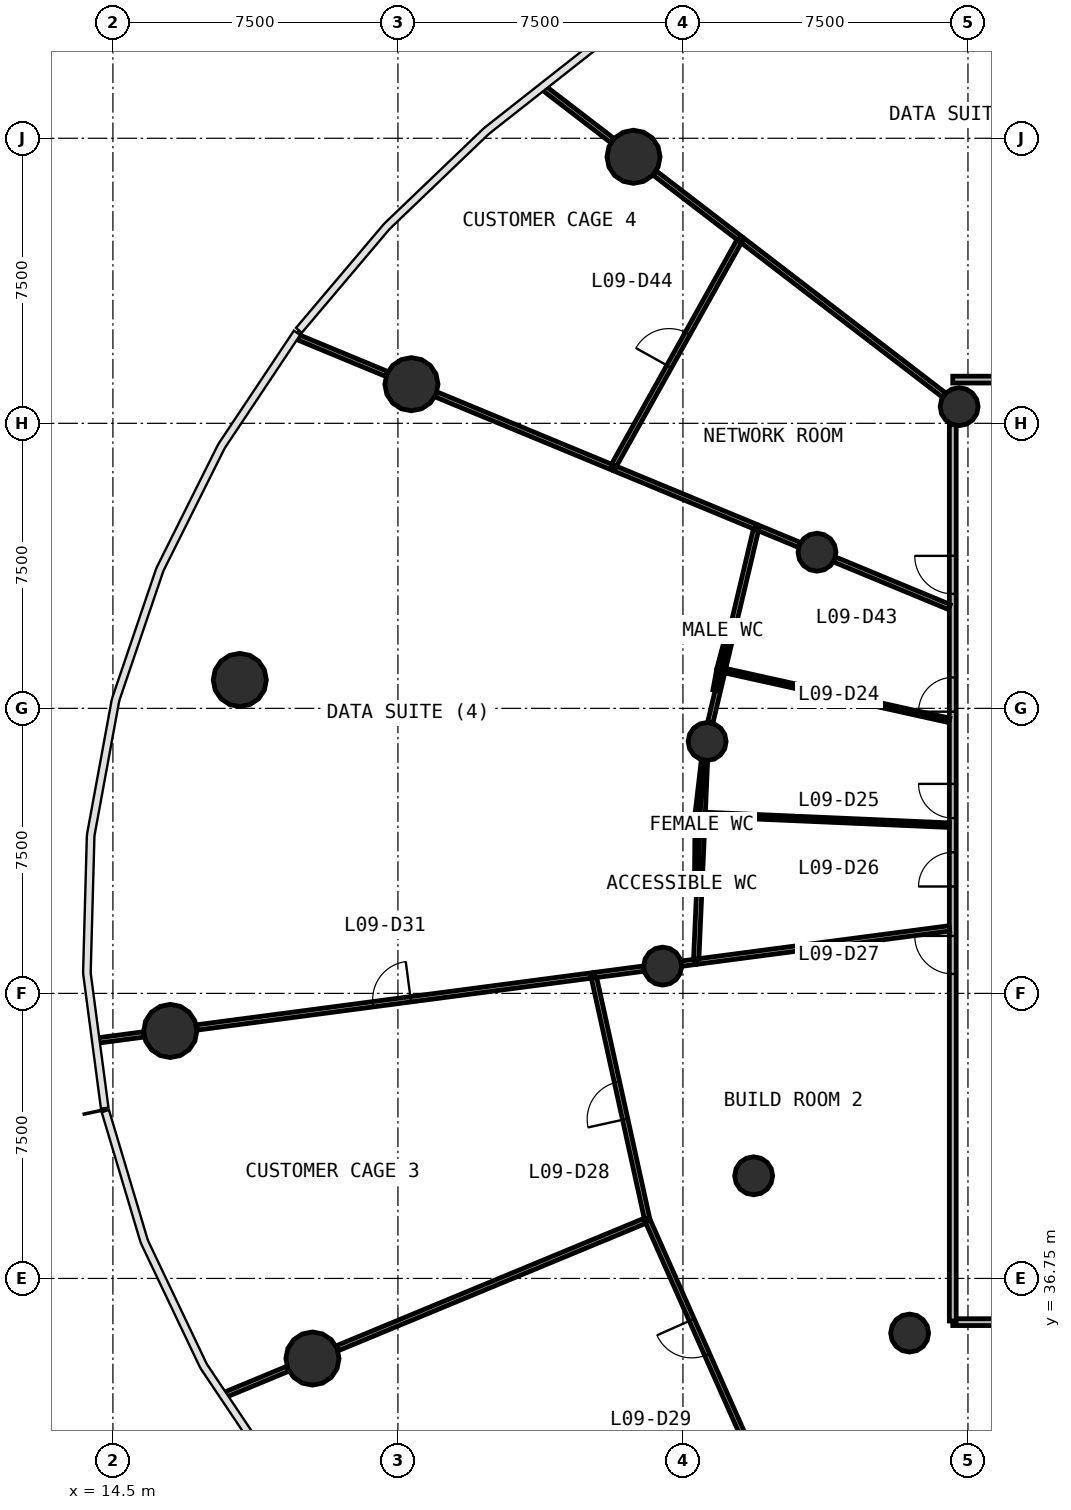
"""IFC4 building model, lengths in metres.
Left out: names, types, materials, properties, quantities, classifications, styles, units other than length and angle.
Written with IfcOpenShell. Run it as: python <this file> out.ifc"""

import sys

from ifc_helpers import new_model, si_unit, direction, frame, frame_2d, origin, origin_2d, place, context, subcontext, project, spatial, rectangle, circle, extrude, source, transform, mapped, element, fill, save


model = new_model("IFC4")
c1 = context("Model", 3, precision=1e-05, world=origin(), true_north=direction((0.0, 1.0)))
c2 = subcontext(c1, "Body", "Model", "MODEL_VIEW")
j1 = project(units=[si_unit("LENGTHUNIT", "METRE"), si_unit("PLANEANGLEUNIT", "RADIAN")], contexts=[c1])
p1 = place(None, origin())
s1 = spatial("IfcSite", under=j1, at=p1, CompositionType="ELEMENT")
p2 = place(p1, origin())
s2 = spatial("IfcBuilding", under=s1, at=p2, CompositionType="ELEMENT")
p3 = place(p2, frame((0.0, 0.0, 40.2)))
s3 = spatial("IfcBuildingStorey", under=s2, at=p3, CompositionType="ELEMENT", Elevation=40.2)
m1 = source(origin(), c2, "Body", "SweptSolid", [
    extrude(circle(Radius=0.7, at=origin_2d()), origin(), (0.0, 0.0, 1.0), 4.4),
])
for number, where, z_axis, x_axis in (
    (1, (28.199, 66.263, 0.0), (0.0, 0.0, 1.0), (1.0, 0.0, 0.0)),
    (2, (22.355, 60.279, 0.0), (0.0, 0.0, 1.0), (1.0, 0.0, 0.0)),
    (3, (17.839, 52.497, 0.0), (0.0, 0.0, 1.0), (1.0, 0.0, 0.0)),
    (4, (16.01, 43.262, 0.0), (0.0, 0.0, 1.0), (1.0, 0.0, 0.0)),
    (5, (19.751, 34.642, 0.0), (0.0, 0.0, 1.0), (1.0, 0.0, 0.0)),
):
    element("IfcColumn", number, at=place(p3, frame(where, z_axis=z_axis, x_axis=x_axis)), inside=s3, PredefinedType="COLUMN", context=c2, shape_type="MappedRepresentation", body=[
        mapped(m1, transform((0.0, 0.0, 0.0), scale=1.0)),
    ])
m2 = source(origin(), c2, "Body", "SweptSolid", [
    extrude(circle(Radius=0.5, at=origin_2d()), origin(), (0.0, 0.0, 1.0), 4.4),
])
for number, where, z_axis, x_axis in (
    (6, (36.768, 59.688, 0.0), (0.0, 0.0, 1.0), (1.0, 0.0, 0.0)),
    (7, (33.028, 55.859, 0.0), (0.0, 0.0, 1.0), (1.0, 0.0, 0.0)),
    (8, (30.137, 50.878, 0.0), (0.0, 0.0, 1.0), (1.0, 0.0, 0.0)),
    (9, (28.966, 44.968, 0.0), (0.0, 0.0, 1.0), (1.0, 0.0, 0.0)),
    (10, (31.361, 39.451, 0.0), (0.0, 0.0, 1.0), (1.0, 0.0, 0.0)),
    (11, (35.465, 35.312, 0.0), (0.0, 0.0, 1.0), (1.0, 0.0, 0.0)),
):
    element("IfcColumn", number, at=place(p3, frame(where, z_axis=z_axis, x_axis=x_axis)), inside=s3, PredefinedType="COLUMN", context=c2, shape_type="MappedRepresentation", body=[
        mapped(m2, transform((0.0, 0.0, 0.0), scale=1.0)),
    ])
p4 = place(p3, frame((67.4, 35.6, 0.0), z_axis=(0.0, 0.0, 1.0), x_axis=(-1.0, 0.0, 0.0)))
e12 = element("IfcWall", 12, at=p4, inside=s3, PredefinedType="PARTITIONING", context=c2, shape_type="SweptSolid", body=[
    extrude(rectangle(XDim=30.8, YDim=0.18, at=frame_2d((15.4, 0.0))), origin(), (0.0, 0.0, 1.0), 3.05),
])
p5 = place(p4, frame((17.35, 0.0, 0.0)))
e13 = element("IfcOpeningElement", 13, at=p5, cuts=e12, PredefinedType="OPENING", context=c2, shape_type="SweptSolid", body=[
    extrude(rectangle(XDim=1.0, YDim=2.1, at=frame_2d((0.5, 1.05))), frame((0.0, 0.1, 0.0), z_axis=(0.0, -1.0, 0.0), x_axis=(1.0, 0.0, 0.0)), (0.0, 0.0, 1.0), 0.2),
])
p6 = place(p4, frame((14.95, 0.0, 0.0)))
e14 = element("IfcOpeningElement", 14, at=p6, cuts=e12, PredefinedType="OPENING", context=c2, shape_type="SweptSolid", body=[
    extrude(rectangle(XDim=1.0, YDim=2.1, at=frame_2d((0.5, 1.05))), frame((0.0, 0.1, 0.0), z_axis=(0.0, -1.0, 0.0), x_axis=(1.0, 0.0, 0.0)), (0.0, 0.0, 1.0), 0.2),
])
p7 = place(p3, frame((36.6, 60.4, 0.0), z_axis=(0.0, 0.0, 1.0), x_axis=(1.0, 0.0, 0.0)))
e15 = element("IfcWall", 15, at=p7, inside=s3, PredefinedType="PARTITIONING", context=c2, shape_type="SweptSolid", body=[
    extrude(rectangle(XDim=30.8, YDim=0.18, at=frame_2d((15.4, 0.0))), origin(), (0.0, 0.0, 1.0), 3.05),
])
p8 = place(p7, frame((20.95, 0.0, 0.0)))
e16 = element("IfcOpeningElement", 16, at=p8, cuts=e15, PredefinedType="OPENING", context=c2, shape_type="SweptSolid", body=[
    extrude(rectangle(XDim=1.0, YDim=2.1, at=frame_2d((0.5, 1.05))), frame((0.0, 0.1, 0.0), z_axis=(0.0, -1.0, 0.0), x_axis=(1.0, 0.0, 0.0)), (0.0, 0.0, 1.0), 0.2),
])
p9 = place(p7, frame((14.95, 0.0, 0.0)))
e17 = element("IfcOpeningElement", 17, at=p9, cuts=e15, PredefinedType="OPENING", context=c2, shape_type="SweptSolid", body=[
    extrude(rectangle(XDim=1.0, YDim=2.1, at=frame_2d((0.5, 1.05))), frame((0.0, 0.1, 0.0), z_axis=(0.0, -1.0, 0.0), x_axis=(1.0, 0.0, 0.0)), (0.0, 0.0, 1.0), 0.2),
])
p10 = place(p7, frame((8.95, 0.0, 0.0)))
e18 = element("IfcOpeningElement", 18, at=p10, cuts=e15, PredefinedType="OPENING", context=c2, shape_type="SweptSolid", body=[
    extrude(rectangle(XDim=1.0, YDim=2.1, at=frame_2d((0.5, 1.05))), frame((0.0, 0.1, 0.0), z_axis=(0.0, -1.0, 0.0), x_axis=(1.0, 0.0, 0.0)), (0.0, 0.0, 1.0), 0.2),
])
p11 = place(p3, frame((36.6, 35.63, 0.0), z_axis=(0.0, 0.0, 1.0), x_axis=(0.0, 1.0, 0.0)))
e19 = element("IfcWall", 19, at=p11, inside=s3, PredefinedType="PARTITIONING", context=c2, shape_type="SweptSolid", body=[
    extrude(rectangle(XDim=23.583, YDim=0.18, at=frame_2d((11.791, 0.0))), origin(), (0.0, 0.0, 1.0), 3.05),
])
p12 = place(p11, frame((16.032, 0.0, 0.0)))
e20 = element("IfcOpeningElement", 20, at=p12, cuts=e19, PredefinedType="OPENING", context=c2, shape_type="SweptSolid", body=[
    extrude(rectangle(XDim=0.9, YDim=2.1, at=frame_2d((0.45, 1.05))), frame((0.0, 0.1, 0.0), z_axis=(0.0, -1.0, 0.0), x_axis=(1.0, 0.0, 0.0)), (0.0, 0.0, 1.0), 0.2),
])
p13 = place(p11, frame((13.232, 0.0, 0.0)))
e21 = element("IfcOpeningElement", 21, at=p13, cuts=e19, PredefinedType="OPENING", context=c2, shape_type="SweptSolid", body=[
    extrude(rectangle(XDim=0.9, YDim=2.1, at=frame_2d((0.45, 1.05))), frame((0.0, 0.1, 0.0), z_axis=(0.0, -1.0, 0.0), x_axis=(1.0, 0.0, 0.0)), (0.0, 0.0, 1.0), 0.2),
])
p14 = place(p11, frame((11.433, 0.0, 0.0)))
e22 = element("IfcOpeningElement", 22, at=p14, cuts=e19, PredefinedType="OPENING", context=c2, shape_type="SweptSolid", body=[
    extrude(rectangle(XDim=0.9, YDim=2.1, at=frame_2d((0.45, 1.05))), frame((0.0, 0.1, 0.0), z_axis=(0.0, -1.0, 0.0), x_axis=(1.0, 0.0, 0.0)), (0.0, 0.0, 1.0), 0.2),
])
p15 = place(p11, frame((9.133, 0.0, 0.0)))
e23 = element("IfcOpeningElement", 23, at=p15, cuts=e19, PredefinedType="OPENING", context=c2, shape_type="SweptSolid", body=[
    extrude(rectangle(XDim=1.0, YDim=2.1, at=frame_2d((0.5, 1.05))), frame((0.0, 0.1, 0.0), z_axis=(0.0, -1.0, 0.0), x_axis=(1.0, 0.0, 0.0)), (0.0, 0.0, 1.0), 0.2),
])
p16 = place(p11, frame((19.133, 0.0, 0.0)))
e24 = element("IfcOpeningElement", 24, at=p16, cuts=e19, PredefinedType="OPENING", context=c2, shape_type="SweptSolid", body=[
    extrude(rectangle(XDim=1.0, YDim=2.1, at=frame_2d((0.5, 1.05))), frame((0.0, 0.1, 0.0), z_axis=(0.0, -1.0, 0.0), x_axis=(1.0, 0.0, 0.0)), (0.0, 0.0, 1.0), 0.2),
])
p17 = place(p3, frame((16.708, 43.354, 0.0), z_axis=(0.0, 0.0, 1.0), x_axis=(0.991445294361, 0.130522903314, 0.0)))
e25 = element("IfcWall", 25, at=p17, inside=s3, PredefinedType="PARTITIONING", context=c2, shape_type="SweptSolid", body=[
    extrude(rectangle(XDim=10.527, YDim=0.14, at=frame_2d((5.264, 0.0))), origin(), (0.0, 0.0, 1.0), 3.05),
])
p18 = place(p17, frame((4.677, 0.0, 0.0)))
e26 = element("IfcOpeningElement", 26, at=p18, cuts=e25, PredefinedType="OPENING", context=c2, shape_type="SweptSolid", body=[
    extrude(rectangle(XDim=1.0, YDim=2.1, at=frame_2d((0.5, 1.05))), frame((0.0, 0.08, 0.0), z_axis=(0.0, -1.0, 0.0), x_axis=(1.0, 0.0, 0.0)), (0.0, 0.0, 1.0), 0.16),
])
p19 = place(p3, frame((28.562, 38.292, 0.0), z_axis=(0.0, 0.0, 1.0), x_axis=(-0.923878024318, -0.382687073445, 0.0)))
e27 = element("IfcWall", 27, at=p19, inside=s3, PredefinedType="PARTITIONING", context=c2, shape_type="SweptSolid", body=[
    extrude(rectangle(XDim=8.832, YDim=0.14, at=frame_2d((4.416, 0.0))), origin(), (0.0, 0.0, 1.0), 3.05),
])
p20 = place(p3, frame((27.65, 58.086, 0.0), z_axis=(0.0, 0.0, 1.0), x_axis=(0.488058671377, 0.872810823314, 0.0)))
e28 = element("IfcWall", 28, at=p20, inside=s3, PredefinedType="PARTITIONING", context=c2, shape_type="SweptSolid", body=[
    extrude(rectangle(XDim=6.894, YDim=0.14, at=frame_2d((3.447, 0.0))), origin(), (0.0, 0.0, 1.0), 3.05),
])
p21 = place(p20, frame((3.043, 0.0, 0.0)))
e29 = element("IfcOpeningElement", 29, at=p21, cuts=e28, PredefinedType="OPENING", context=c2, shape_type="SweptSolid", body=[
    extrude(rectangle(XDim=1.0, YDim=2.1, at=frame_2d((0.5, 1.05))), frame((0.0, 0.08, 0.0), z_axis=(0.0, -1.0, 0.0), x_axis=(1.0, 0.0, 0.0)), (0.0, 0.0, 1.0), 0.16),
])
p22 = place(p3, frame((36.51, 45.961, 0.0), z_axis=(0.0, 0.0, 1.0), x_axis=(-0.991446999642, -0.130509949431, 0.0)))
e30 = element("IfcWall", 30, at=p22, inside=s3, PredefinedType="PARTITIONING", context=c2, shape_type="SweptSolid", body=[
    extrude(rectangle(XDim=6.721, YDim=0.14, at=frame_2d((3.361, 0.0))), origin(), (0.0, 0.0, 1.0), 3.05),
])
p23 = place(p3, frame((31.292, 32.146, 0.0), z_axis=(0.0, 0.0, 1.0), x_axis=(-0.40591511996, 0.913910780869, 0.0)))
e31 = element("IfcWall", 31, at=p23, inside=s3, PredefinedType="PARTITIONING", context=c2, shape_type="SweptSolid", body=[
    extrude(rectangle(XDim=6.694, YDim=0.14, at=frame_2d((3.347, 0.0))), origin(), (0.0, 0.0, 1.0), 3.05),
])
p24 = place(p23, frame((2.844, 0.0, 0.0)))
e32 = element("IfcOpeningElement", 32, at=p24, cuts=e31, PredefinedType="OPENING", context=c2, shape_type="SweptSolid", body=[
    extrude(rectangle(XDim=1.0, YDim=2.1, at=frame_2d((0.5, 1.05))), frame((0.0, 0.08, 0.0), z_axis=(0.0, -1.0, 0.0), x_axis=(1.0, 0.0, 0.0)), (0.0, 0.0, 1.0), 0.16),
])
p25 = place(p3, frame((36.367, 59.995, 0.0), z_axis=(0.0, 0.0, 1.0), x_axis=(-0.793356148501, 0.60875776926, 0.0)))
e33 = element("IfcWall", 33, at=p25, inside=s3, PredefinedType="PARTITIONING", context=c2, shape_type="SweptSolid", body=[
    extrude(rectangle(XDim=6.676, YDim=0.14, at=frame_2d((3.338, 0.0))), origin(), (0.0, 0.0, 1.0), 3.05),
])
p26 = place(p3, frame((28.556, 38.321, 0.0), z_axis=(0.0, 0.0, 1.0), x_axis=(-0.21508144295, 0.976596115546, 0.0)))
e34 = element("IfcWall", 34, at=p26, inside=s3, PredefinedType="PARTITIONING", context=c2, shape_type="SweptSolid", body=[
    extrude(rectangle(XDim=6.53, YDim=0.14, at=frame_2d((3.265, 0.0))), origin(), (0.0, 0.0, 1.0), 3.05),
])
p27 = place(p26, frame((2.68, 0.0, 0.0)))
e35 = element("IfcOpeningElement", 35, at=p27, cuts=e34, PredefinedType="OPENING", context=c2, shape_type="SweptSolid", body=[
    extrude(rectangle(XDim=1.0, YDim=2.1, at=frame_2d((0.5, 1.05))), frame((0.0, 0.08, 0.0), z_axis=(0.0, -1.0, 0.0), x_axis=(1.0, 0.0, 0.0)), (0.0, 0.0, 1.0), 0.16),
])
p28 = place(p3, frame((30.08, 50.377, 0.0), z_axis=(0.0, 0.0, 1.0), x_axis=(-0.044134411389, -0.99902560214, 0.0)))
e36 = element("IfcWall", 36, at=p28, inside=s3, PredefinedType="PARTITIONING", context=c2, shape_type="SweptSolid", body=[
    extrude(rectangle(XDim=5.228, YDim=0.14, at=frame_2d((2.614, 0.0))), origin(), (0.0, 0.0, 1.0), 3.05),
])
p29 = place(p3, frame((31.437, 56.518, 0.0), z_axis=(0.0, 0.0, 1.0), x_axis=(-0.230427237718, -0.973089558118, 0.0)))
e37 = element("IfcWall", 37, at=p29, inside=s3, PredefinedType="PARTITIONING", context=c2, shape_type="SweptSolid", body=[
    extrude(rectangle(XDim=5.284, YDim=0.14, at=frame_2d((2.642, 0.0))), origin(), (0.0, 0.0, 1.0), 3.05),
])
p30 = place(p3, frame((27.623, 58.097, 0.0), z_axis=(0.0, 0.0, 1.0), x_axis=(-0.923864356011, 0.382720069622, 0.0)))
e38 = element("IfcWall", 38, at=p30, inside=s3, PredefinedType="PARTITIONING", context=c2, shape_type="SweptSolid", body=[
    extrude(rectangle(XDim=4.996, YDim=0.14, at=frame_2d((2.498, 0.0))), origin(), (0.0, 0.0, 1.0), 3.05),
])
p31 = place(p3, frame((31.409, 56.529, 0.0), z_axis=(0.0, 0.0, 1.0), x_axis=(-0.923871694758, 0.382702353827, 0.0)))
e39 = element("IfcWall", 39, at=p31, inside=s3, PredefinedType="PARTITIONING", context=c2, shape_type="SweptSolid", body=[
    extrude(rectangle(XDim=3.998, YDim=0.14, at=frame_2d((1.999, 0.0))), origin(), (0.0, 0.0, 1.0), 3.05),
])
p32 = place(p3, frame((36.51, 54.416, 0.0), z_axis=(0.0, 0.0, 1.0), x_axis=(-0.923911109142, 0.382607190737, 0.0)))
e40 = element("IfcWall", 40, at=p32, inside=s3, PredefinedType="PARTITIONING", context=c2, shape_type="SweptSolid", body=[
    extrude(rectangle(XDim=3.264, YDim=0.14, at=frame_2d((1.632, 0.0))), origin(), (0.0, 0.0, 1.0), 3.05),
])
p33 = place(p3, frame((30.991, 64.121, 0.0), z_axis=(0.0, 0.0, 1.0), x_axis=(-0.793361942245, 0.60875021856, 0.0)))
e41 = element("IfcWall", 41, at=p33, inside=s3, PredefinedType="PARTITIONING", context=c2, shape_type="SweptSolid", body=[
    extrude(rectangle(XDim=2.814, YDim=0.14, at=frame_2d((1.407, 0.0))), origin(), (0.0, 0.0, 1.0), 3.05),
])
p34 = place(p3, frame((21.704, 60.549, 0.0), z_axis=(0.0, 0.0, 1.0), x_axis=(-0.923879092029, 0.382684495781, 0.0)))
e42 = element("IfcWall", 42, at=p34, inside=s3, PredefinedType="PARTITIONING", context=c2, shape_type="SweptSolid", body=[
    extrude(rectangle(XDim=2.506, YDim=0.14, at=frame_2d((1.253, 0.0))), origin(), (0.0, 0.0, 1.0), 3.05),
])
p35 = place(p3, frame((27.641, 66.691, 0.0), z_axis=(0.0, 0.0, 1.0), x_axis=(-0.793298337488, 0.608833103353, 0.0)))
e43 = element("IfcWall", 43, at=p35, inside=s3, PredefinedType="PARTITIONING", context=c2, shape_type="SweptSolid", body=[
    extrude(rectangle(XDim=2.246, YDim=0.14, at=frame_2d((1.123, 0.0))), origin(), (0.0, 0.0, 1.0), 3.05),
])
p36 = place(p3, frame((19.1, 34.372, 0.0), z_axis=(0.0, 0.0, 1.0), x_axis=(-0.92390604877, -0.382619410179, 0.0)))
e44 = element("IfcWall", 44, at=p36, inside=s3, PredefinedType="PARTITIONING", context=c2, shape_type="SweptSolid", body=[
    extrude(rectangle(XDim=1.772, YDim=0.14, at=frame_2d((0.886, 0.0))), origin(), (0.0, 0.0, 1.0), 3.05),
])
p37 = place(p3, frame((28.466, 44.902, 0.0), z_axis=(0.0, 0.0, 1.0), x_axis=(-0.991458759568, -0.130420581489, 0.0)))
e45 = element("IfcWall", 45, at=p37, inside=s3, PredefinedType="PARTITIONING", context=c2, shape_type="SweptSolid", body=[
    extrude(rectangle(XDim=1.303, YDim=0.14, at=frame_2d((0.651, 0.0))), origin(), (0.0, 0.0, 1.0), 3.05),
])
p38 = place(p3, frame((15.311, 43.17, 0.0), z_axis=(0.0, 0.0, 1.0), x_axis=(-0.991444195162, -0.130531252505, 0.0)))
e46 = element("IfcWall", 46, at=p38, inside=s3, PredefinedType="PARTITIONING", context=c2, shape_type="SweptSolid", body=[
    extrude(rectangle(XDim=1.234, YDim=0.14, at=frame_2d((0.617, 0.0))), origin(), (0.0, 0.0, 1.0), 3.05),
])
p39 = place(p3, frame((32.561, 56.052, 0.0), z_axis=(0.0, 0.0, 1.0), x_axis=(-0.923881792955, 0.382677975126, 0.0)))
e47 = element("IfcWall", 47, at=p39, inside=s3, PredefinedType="PARTITIONING", context=c2, shape_type="SweptSolid", body=[
    extrude(rectangle(XDim=1.146, YDim=0.14, at=frame_2d((0.573, 0.0))), origin(), (0.0, 0.0, 1.0), 3.05),
])
p40 = place(p3, frame((29.816, 45.08, 0.0), z_axis=(0.0, 0.0, 1.0), x_axis=(-0.99142603388, -0.13066912162, 0.0)))
e48 = element("IfcWall", 48, at=p40, inside=s3, PredefinedType="PARTITIONING", context=c2, shape_type="SweptSolid", body=[
    extrude(rectangle(XDim=0.353, YDim=0.14, at=frame_2d((0.177, 0.0))), origin(), (0.0, 0.0, 1.0), 3.05),
])
p41 = place(p3, frame((36.51, 48.676, 0.0), z_axis=(0.0, 0.0, 1.0), x_axis=(-0.99904754033, 0.043634987792, 0.0)))
e49 = element("IfcWall", 49, at=p41, inside=s3, PredefinedType="PARTITIONING", context=c2, shape_type="SweptSolid", body=[
    extrude(rectangle(XDim=6.429, YDim=0.12, at=frame_2d((3.214, 0.0))), origin(), (0.0, 0.0, 1.0), 3.05),
])
p42 = place(p3, frame((36.51, 51.434, 0.0), z_axis=(0.0, 0.0, 1.0), x_axis=(-0.976293481876, 0.216451004264, 0.0)))
e50 = element("IfcWall", 50, at=p42, inside=s3, PredefinedType="PARTITIONING", context=c2, shape_type="SweptSolid", body=[
    extrude(rectangle(XDim=6.039, YDim=0.12, at=frame_2d((3.02, 0.0))), origin(), (0.0, 0.0, 1.0), 3.05),
])
p43 = place(p3, frame((29.878, 48.966, 0.0), z_axis=(0.0, 0.0, 1.0), x_axis=(-0.008193346553, -0.999966433973, 0.0)))
e51 = element("IfcWall", 51, at=p43, inside=s3, PredefinedType="PARTITIONING", context=c2, shape_type="SweptSolid", body=[
    extrude(rectangle(XDim=1.937, YDim=0.12, at=frame_2d((0.968, 0.0))), origin(), (0.0, 0.0, 1.0), 3.05),
])
p44 = place(p3, frame((30.737, 53.865, 0.0), z_axis=(0.0, 0.0, 1.0), x_axis=(-0.255027437649, -0.966933816787, 0.0)))
e52 = element("IfcWall", 52, at=p44, inside=s3, PredefinedType="PARTITIONING", context=c2, shape_type="SweptSolid", body=[
    extrude(rectangle(XDim=1.125, YDim=0.12, at=frame_2d((0.562, 0.0))), origin(), (0.0, 0.0, 1.0), 3.05),
])
p45 = place(p3, frame((30.044, 50.382, 0.0), z_axis=(0.0, 0.0, 1.0), x_axis=(-0.116303421497, -0.993213730346, 0.0)))
e53 = element("IfcWall", 53, at=p45, inside=s3, PredefinedType="PARTITIONING", context=c2, shape_type="SweptSolid", body=[
    extrude(rectangle(XDim=1.396, YDim=0.12, at=frame_2d((0.698, 0.0))), origin(), (0.0, 0.0, 1.0), 3.05),
])
p46 = place(p3, frame((30.444, 52.748, 0.0), z_axis=(0.0, 0.0, 1.0), x_axis=(-0.180060539473, -0.983655530216, 0.0)))
e54 = element("IfcWall", 54, at=p46, inside=s3, PredefinedType="PARTITIONING", context=c2, shape_type="SweptSolid", body=[
    extrude(rectangle(XDim=0.53, YDim=0.12, at=frame_2d((0.265, 0.0))), origin(), (0.0, 0.0, 1.0), 3.05),
])
m3 = source(origin(), c2, "Body", "SweptSolid", [
    extrude(rectangle(XDim=0.9, YDim=2.1, at=frame_2d((0.45, 1.05))), frame((0.0, 0.025, 0.0), z_axis=(0.0, -1.0, 0.0), x_axis=(1.0, 0.0, 0.0)), (0.0, 0.0, 1.0), 0.05),
])
p47 = place(p12, origin())
e55 = element("IfcDoor", 55, at=p47, inside=s3, OperationType="SINGLE_SWING_LEFT", PredefinedType="DOOR", context=c2, shape_type="MappedRepresentation", body=[
    mapped(m3, transform((0.0, 0.0, 0.0), scale=1.0)),
])
fill(e20, e55)
p48 = place(p13, origin())
e56 = element("IfcDoor", 56, at=p48, inside=s3, OperationType="SINGLE_SWING_RIGHT", PredefinedType="DOOR", context=c2, shape_type="MappedRepresentation", body=[
    mapped(m3, transform((0.0, 0.0, 0.0), scale=1.0)),
])
fill(e21, e56)
p49 = place(p14, origin())
e57 = element("IfcDoor", 57, at=p49, inside=s3, OperationType="SINGLE_SWING_LEFT", PredefinedType="DOOR", context=c2, shape_type="MappedRepresentation", body=[
    mapped(m3, transform((0.0, 0.0, 0.0), scale=1.0)),
])
fill(e22, e57)
m4 = source(origin(), c2, "Body", "SweptSolid", [
    extrude(rectangle(XDim=1.0, YDim=2.1, at=frame_2d((0.5, 1.05))), frame((0.0, 0.025, 0.0), z_axis=(0.0, -1.0, 0.0), x_axis=(1.0, 0.0, 0.0)), (0.0, 0.0, 1.0), 0.05),
])
p50 = place(p15, origin())
e58 = element("IfcDoor", 58, at=p50, inside=s3, OperationType="SINGLE_SWING_RIGHT", PredefinedType="DOOR", context=c2, shape_type="MappedRepresentation", body=[
    mapped(m4, transform((0.0, 0.0, 0.0), scale=1.0)),
])
fill(e23, e58)
p51 = place(p27, origin())
e59 = element("IfcDoor", 59, at=p51, inside=s3, OperationType="SINGLE_SWING_LEFT", PredefinedType="DOOR", context=c2, shape_type="MappedRepresentation", body=[
    mapped(m4, transform((0.0, 0.0, 0.0), scale=1.0)),
])
fill(e35, e59)
p52 = place(p24, origin())
e60 = element("IfcDoor", 60, at=p52, inside=s3, OperationType="SINGLE_SWING_RIGHT", PredefinedType="DOOR", context=c2, shape_type="MappedRepresentation", body=[
    mapped(m4, transform((0.0, 0.0, 0.0), scale=1.0)),
])
fill(e32, e60)
p53 = place(p18, origin())
e61 = element("IfcDoor", 61, at=p53, inside=s3, OperationType="SINGLE_SWING_RIGHT", PredefinedType="DOOR", context=c2, shape_type="MappedRepresentation", body=[
    mapped(m4, transform((0.0, 0.0, 0.0), scale=1.0)),
])
fill(e26, e61)
p54 = place(p16, origin())
e62 = element("IfcDoor", 62, at=p54, inside=s3, OperationType="SINGLE_SWING_RIGHT", PredefinedType="DOOR", context=c2, shape_type="MappedRepresentation", body=[
    mapped(m4, transform((0.0, 0.0, 0.0), scale=1.0)),
])
fill(e24, e62)
p55 = place(p21, origin())
e63 = element("IfcDoor", 63, at=p55, inside=s3, OperationType="SINGLE_SWING_LEFT", PredefinedType="DOOR", context=c2, shape_type="MappedRepresentation", body=[
    mapped(m4, transform((0.0, 0.0, 0.0), scale=1.0)),
])
fill(e29, e63)
save(model, sys.argv[1])
